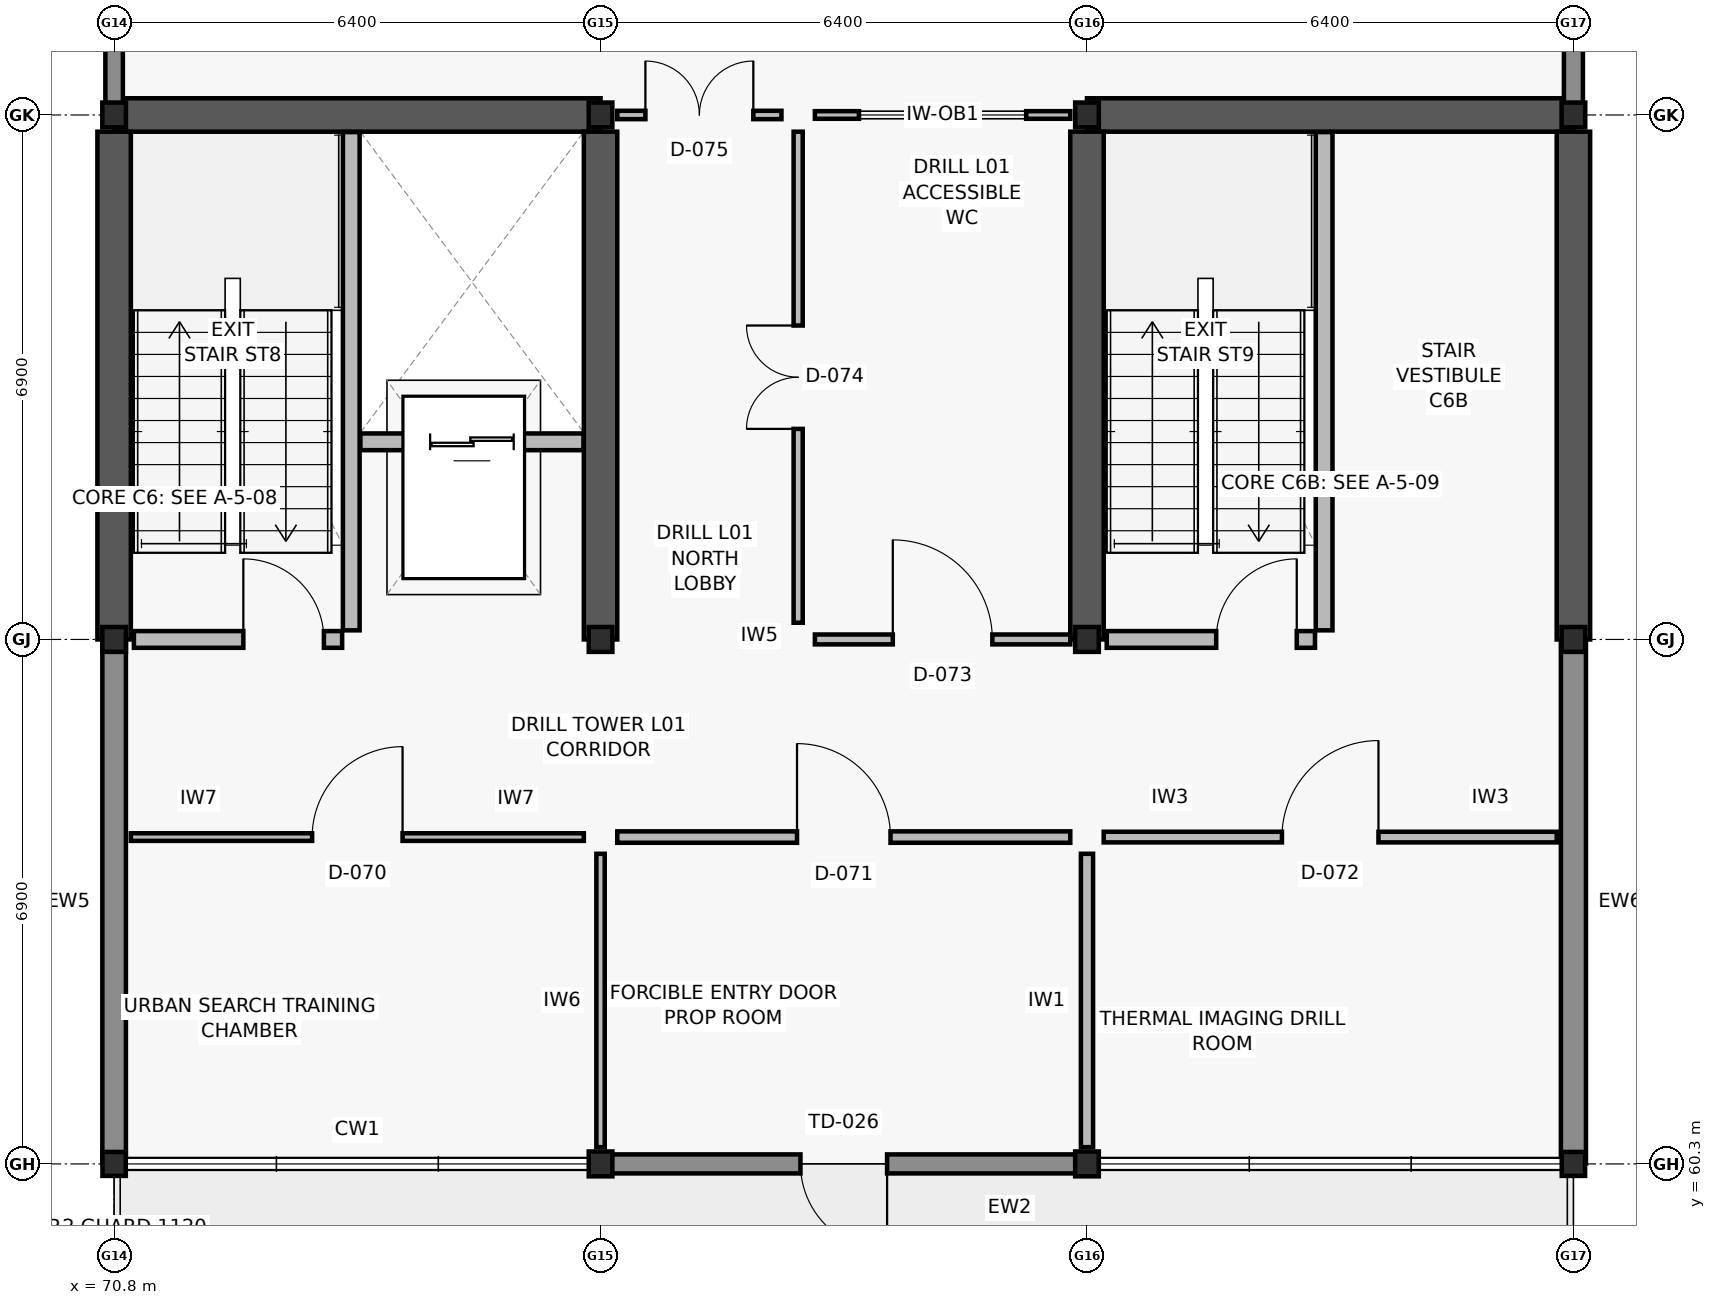
"""IFC4 building model, lengths in metres.
Left out: names, types, materials, properties, quantities, classifications, styles, units other than length and angle.
Written with IfcOpenShell. Run it as: python <this file> out.ifc"""

import sys

from ifc_helpers import new_model, si_unit, direction, frame, frame_2d, origin, origin_2d, place, context, subcontext, project, spatial, rectangle, i_section, extrude, element, fill, save


model = new_model("IFC4")
c1 = context("Model", 3, precision=1e-05, world=origin(), true_north=direction((0.0, 1.0)))
c2 = subcontext(c1, "Body", "Model", "MODEL_VIEW")
j1 = project(units=[si_unit("LENGTHUNIT", "METRE"), si_unit("PLANEANGLEUNIT", "RADIAN")], contexts=[c1])
p1 = place(None, origin())
s1 = spatial("IfcSite", under=j1, at=p1, CompositionType="ELEMENT")
p2 = place(p1, origin())
s2 = spatial("IfcBuilding", under=s1, at=p2, CompositionType="ELEMENT")
p3 = place(p2, frame((0.0, 0.0, 5.4)))
s3 = spatial("IfcBuildingStorey", under=s2, at=p3, CompositionType="ELEMENT", Elevation=5.4)
p4 = place(p3, frame((70.8, 60.3, 0.0), z_axis=(0.0, 0.0, 1.0), x_axis=(1.0, 0.0, 0.0)))
e1 = element("IfcColumn", 1, at=p4, inside=s3, PredefinedType="COLUMN", context=c2, shape_type="SweptSolid", body=[
    extrude(i_section(OverallWidth=0.307, OverallDepth=0.315, WebThickness=0.012, FlangeThickness=0.019, FilletRadius=0.017, at=origin_2d()), origin(), (0.0, 0.0, 1.0), 4.2),
])
for number, where, z_axis, x_axis in (
    (2, (70.8, 67.2, 0.0), (0.0, 0.0, 1.0), (1.0, 0.0, 0.0)),
    (3, (70.8, 74.1, 0.0), (0.0, 0.0, 1.0), (1.0, 0.0, 0.0)),
    (4, (77.2, 60.3, 0.0), (0.0, 0.0, 1.0), (1.0, 0.0, 0.0)),
    (5, (77.2, 67.2, 0.0), (0.0, 0.0, 1.0), (1.0, 0.0, 0.0)),
    (6, (77.2, 74.1, 0.0), (0.0, 0.0, 1.0), (1.0, 0.0, 0.0)),
    (7, (83.6, 60.3, 0.0), (0.0, 0.0, 1.0), (1.0, 0.0, 0.0)),
    (8, (83.6, 67.2, 0.0), (0.0, 0.0, 1.0), (1.0, 0.0, 0.0)),
    (9, (83.6, 74.1, 0.0), (0.0, 0.0, 1.0), (1.0, 0.0, 0.0)),
):
    element("IfcColumn", number, at=place(p3, frame(where, z_axis=z_axis, x_axis=x_axis)), inside=s3, PredefinedType="COLUMN", context=c2, shape_type="SweptSolid", body=[
        extrude(i_section(OverallWidth=0.311, OverallDepth=0.327, WebThickness=0.016, FlangeThickness=0.025, FilletRadius=0.017, at=origin_2d()), origin(), (0.0, 0.0, 1.0), 4.2),
    ])
p5 = place(p3, frame((90.0, 60.3, 0.0), z_axis=(0.0, 0.0, 1.0), x_axis=(1.0, 0.0, 0.0)))
e10 = element("IfcColumn", 10, at=p5, inside=s3, PredefinedType="COLUMN", context=c2, shape_type="SweptSolid", body=[
    extrude(i_section(OverallWidth=0.307, OverallDepth=0.315, WebThickness=0.012, FlangeThickness=0.019, FilletRadius=0.017, at=origin_2d()), origin(), (0.0, 0.0, 1.0), 4.2),
])
for number, where, z_axis, x_axis in (
    (11, (90.0, 67.2, 0.0), (0.0, 0.0, 1.0), (1.0, 0.0, 0.0)),
    (12, (90.0, 74.1, 0.0), (0.0, 0.0, 1.0), (1.0, 0.0, 0.0)),
):
    element("IfcColumn", number, at=place(p3, frame(where, z_axis=z_axis, x_axis=x_axis)), inside=s3, PredefinedType="COLUMN", context=c2, shape_type="SweptSolid", body=[
        extrude(i_section(OverallWidth=0.311, OverallDepth=0.327, WebThickness=0.016, FlangeThickness=0.025, FilletRadius=0.017, at=origin_2d()), origin(), (0.0, 0.0, 1.0), 4.2),
    ])
p6 = place(p3, frame((70.8, 74.1, 0.0), z_axis=(0.0, 0.0, 1.0), x_axis=(1.0, 0.0, 0.0)))
e13 = element("IfcWall", 13, at=p6, inside=s3, PredefinedType="SHEAR", context=c2, shape_type="SweptSolid", body=[
    extrude(rectangle(XDim=6.4, YDim=0.44, at=frame_2d((3.2, 0.0))), origin(), (0.0, 0.0, 1.0), 3.96),
])
for number, where, z_axis, x_axis in (
    (14, (70.8, 67.2, 0.0), (0.0, 0.0, 1.0), (0.0, 1.0, 0.0)),
    (15, (77.2, 67.2, 0.0), (0.0, 0.0, 1.0), (0.0, 1.0, 0.0)),
):
    element("IfcWall", number, at=place(p3, frame(where, z_axis=z_axis, x_axis=x_axis)), inside=s3, PredefinedType="SHEAR", context=c2, shape_type="SweptSolid", body=[
        extrude(rectangle(XDim=6.68, YDim=0.44, at=frame_2d((3.34, 0.0))), origin(), (0.0, 0.0, 1.0), 3.96),
    ])
p7 = place(p3, frame((83.6, 74.1, 0.0), z_axis=(0.0, 0.0, 1.0), x_axis=(1.0, 0.0, 0.0)))
e16 = element("IfcWall", 16, at=p7, inside=s3, PredefinedType="SHEAR", context=c2, shape_type="SweptSolid", body=[
    extrude(rectangle(XDim=6.4, YDim=0.44, at=frame_2d((3.2, 0.0))), origin(), (0.0, 0.0, 1.0), 3.96),
])
for number, where, z_axis, x_axis in (
    (17, (83.6, 67.2, 0.0), (0.0, 0.0, 1.0), (0.0, 1.0, 0.0)),
    (18, (90.0, 67.2, 0.0), (0.0, 0.0, 1.0), (0.0, 1.0, 0.0)),
):
    element("IfcWall", number, at=place(p3, frame(where, z_axis=z_axis, x_axis=x_axis)), inside=s3, PredefinedType="SHEAR", context=c2, shape_type="SweptSolid", body=[
        extrude(rectangle(XDim=6.68, YDim=0.44, at=frame_2d((3.34, 0.0))), origin(), (0.0, 0.0, 1.0), 3.96),
    ])
p8 = place(p3, frame((83.595, 60.3, 0.0), z_axis=(0.0, 0.0, 1.0), x_axis=(-1.0, 0.0, 0.0)))
e19 = element("IfcWall", 19, at=p8, inside=s3, PredefinedType="SOLIDWALL", context=c2, shape_type="SweptSolid", body=[
    extrude(rectangle(XDim=6.39, YDim=0.25, at=frame_2d((3.195, 0.0))), origin(), (0.0, 0.0, 1.0), 3.32),
])
p9 = place(p8, frame((2.625, 0.0, 0.0)))
e20 = element("IfcOpeningElement", 20, at=p9, cuts=e19, PredefinedType="OPENING", context=c2, shape_type="SweptSolid", body=[
    extrude(rectangle(XDim=1.14, YDim=2.14, at=frame_2d((0.57, 1.07))), frame((0.0, 0.135, 0.0), z_axis=(0.0, -1.0, 0.0), x_axis=(1.0, 0.0, 0.0)), (0.0, 0.0, 1.0), 0.27),
])
p10 = place(p3, frame((70.8, 60.305, 0.0), z_axis=(0.0, 0.0, 1.0), x_axis=(0.0, 1.0, 0.0)))
e21 = element("IfcWall", 21, at=p10, inside=s3, PredefinedType="SOLIDWALL", context=c2, shape_type="SweptSolid", body=[
    extrude(rectangle(XDim=6.89, YDim=0.31, at=frame_2d((3.445, 0.0))), origin(), (0.0, 0.0, 1.0), 3.32),
])
p11 = place(p3, frame((90.0, 67.195, 0.0), z_axis=(0.0, 0.0, 1.0), x_axis=(0.0, -1.0, 0.0)))
e22 = element("IfcWall", 22, at=p11, inside=s3, PredefinedType="SOLIDWALL", context=c2, shape_type="SweptSolid", body=[
    extrude(rectangle(XDim=6.89, YDim=0.33, at=frame_2d((3.445, 0.0))), origin(), (0.0, 0.0, 1.0), 3.32),
])
p12 = place(p3, frame((70.8, 74.105, 0.0), z_axis=(0.0, 0.0, 1.0), x_axis=(0.0, 1.0, 0.0)))
e23 = element("IfcWall", 23, at=p12, inside=s3, PredefinedType="SOLIDWALL", context=c2, shape_type="SweptSolid", body=[
    extrude(rectangle(XDim=6.89, YDim=0.23, at=frame_2d((3.445, 0.0))), origin(), (0.0, 0.0, 1.0), 3.32),
])
p13 = place(p12, frame((1.895, 0.0, 0.8)))
e24 = element("IfcOpeningElement", 24, at=p13, cuts=e23, PredefinedType="OPENING", context=c2, shape_type="SweptSolid", body=[
    extrude(rectangle(XDim=3.1, YDim=1.15, at=frame_2d((1.55, 0.575))), frame((0.0, 0.125, 0.0), z_axis=(0.0, -1.0, 0.0), x_axis=(1.0, 0.0, 0.0)), (0.0, 0.0, 1.0), 0.25),
])
p14 = place(p3, frame((90.0, 80.995, 0.0), z_axis=(0.0, 0.0, 1.0), x_axis=(0.0, -1.0, 0.0)))
e25 = element("IfcWall", 25, at=p14, inside=s3, PredefinedType="SOLIDWALL", context=c2, shape_type="SweptSolid", body=[
    extrude(rectangle(XDim=6.89, YDim=0.25, at=frame_2d((3.445, 0.0))), origin(), (0.0, 0.0, 1.0), 3.32),
])
p15 = place(p14, frame((1.795, 0.0, 0.8)))
e26 = element("IfcOpeningElement", 26, at=p15, cuts=e25, PredefinedType="OPENING", context=c2, shape_type="SweptSolid", body=[
    extrude(rectangle(XDim=3.3, YDim=1.25, at=frame_2d((1.65, 0.625))), frame((0.0, 0.135, 0.0), z_axis=(0.0, -1.0, 0.0), x_axis=(1.0, 0.0, 0.0)), (0.0, 0.0, 1.0), 0.27),
])
p16 = place(p3, frame((73.92, 67.32, 0.0), z_axis=(0.0, 0.0, 1.0), x_axis=(0.0, 1.0, 0.0)))
e27 = element("IfcWall", 27, at=p16, inside=s3, PredefinedType="SOLIDWALL", context=c2, shape_type="SweptSolid", body=[
    extrude(rectangle(XDim=6.555, YDim=0.22, at=frame_2d((3.277, 0.0))), origin(), (0.0, 0.0, 1.0), 3.96),
])
p17 = place(p3, frame((71.06, 67.2, 0.0), z_axis=(0.0, 0.0, 1.0), x_axis=(1.0, 0.0, 0.0)))
e28 = element("IfcWall", 28, at=p17, inside=s3, PredefinedType="SOLIDWALL", context=c2, shape_type="SweptSolid", body=[
    extrude(rectangle(XDim=2.74, YDim=0.22, at=frame_2d((1.37, 0.0))), origin(), (0.0, 0.0, 1.0), 3.32),
])
p18 = place(p17, frame((1.44, 0.0, 0.0)))
e29 = element("IfcOpeningElement", 29, at=p18, cuts=e28, PredefinedType="OPENING", context=c2, shape_type="SweptSolid", body=[
    extrude(rectangle(XDim=1.06, YDim=2.1, at=frame_2d((0.53, 1.05))), frame((0.0, 0.12, 0.0), z_axis=(0.0, -1.0, 0.0), x_axis=(1.0, 0.0, 0.0)), (0.0, 0.0, 1.0), 0.24),
])
p19 = place(p3, frame((74.04, 69.8, 0.0), z_axis=(0.0, 0.0, 1.0), x_axis=(1.0, 0.0, 0.0)))
e30 = element("IfcWall", 30, at=p19, inside=s3, PredefinedType="SOLIDWALL", context=c2, shape_type="SweptSolid", body=[
    extrude(rectangle(XDim=2.935, YDim=0.22, at=frame_2d((1.468, 0.0))), origin(), (0.0, 0.0, 1.0), 3.96),
])
p20 = place(p19, frame((0.917, 0.0, 0.0)))
e31 = element("IfcOpeningElement", 31, at=p20, cuts=e30, PredefinedType="OPENING", context=c2, shape_type="SweptSolid", body=[
    extrude(rectangle(XDim=1.1, YDim=2.1, at=frame_2d((0.55, 1.05))), frame((0.0, 0.12, 0.0), z_axis=(0.0, -1.0, 0.0), x_axis=(1.0, 0.0, 0.0)), (0.0, 0.0, 1.0), 0.24),
])
p21 = place(p3, frame((86.72, 67.32, 0.0), z_axis=(0.0, 0.0, 1.0), x_axis=(0.0, 1.0, 0.0)))
e32 = element("IfcWall", 32, at=p21, inside=s3, PredefinedType="SOLIDWALL", context=c2, shape_type="SweptSolid", body=[
    extrude(rectangle(XDim=6.555, YDim=0.22, at=frame_2d((3.277, 0.0))), origin(), (0.0, 0.0, 1.0), 3.96),
])
p22 = place(p3, frame((83.86, 67.2, 0.0), z_axis=(0.0, 0.0, 1.0), x_axis=(1.0, 0.0, 0.0)))
e33 = element("IfcWall", 33, at=p22, inside=s3, PredefinedType="SOLIDWALL", context=c2, shape_type="SweptSolid", body=[
    extrude(rectangle(XDim=2.74, YDim=0.22, at=frame_2d((1.37, 0.0))), origin(), (0.0, 0.0, 1.0), 3.32),
])
p23 = place(p22, frame((1.44, 0.0, 0.0)))
e34 = element("IfcOpeningElement", 34, at=p23, cuts=e33, PredefinedType="OPENING", context=c2, shape_type="SweptSolid", body=[
    extrude(rectangle(XDim=1.06, YDim=2.1, at=frame_2d((0.53, 1.05))), frame((0.0, 0.12, 0.0), z_axis=(0.0, -1.0, 0.0), x_axis=(1.0, 0.0, 0.0)), (0.0, 0.0, 1.0), 0.24),
])
p24 = place(p3, frame((77.2, 60.52, 0.0), z_axis=(0.0, 0.0, 1.0), x_axis=(0.0, 1.0, 0.0)))
e35 = element("IfcWall", 35, at=p24, inside=s3, PredefinedType="PARTITIONING", context=c2, shape_type="SweptSolid", body=[
    extrude(rectangle(XDim=3.86, YDim=0.11, at=frame_2d((1.93, 0.0))), origin(), (0.0, 0.0, 1.0), 3.3),
])
p25 = place(p3, frame((71.02, 64.6, 0.0), z_axis=(0.0, 0.0, 1.0), x_axis=(1.0, 0.0, 0.0)))
e36 = element("IfcWall", 36, at=p25, inside=s3, PredefinedType="PARTITIONING", context=c2, shape_type="SweptSolid", body=[
    extrude(rectangle(XDim=5.96, YDim=0.1, at=frame_2d((2.98, 0.0))), origin(), (0.0, 0.0, 1.0), 3.3),
])
p26 = place(p25, frame((2.385, 0.0, 0.0)))
e37 = element("IfcOpeningElement", 37, at=p26, cuts=e36, PredefinedType="OPENING", context=c2, shape_type="SweptSolid", body=[
    extrude(rectangle(XDim=1.19, YDim=2.14, at=frame_2d((0.595, 1.07))), frame((0.0, 0.06, 0.0), z_axis=(0.0, -1.0, 0.0), x_axis=(1.0, 0.0, 0.0)), (0.0, 0.0, 1.0), 0.12),
])
p27 = place(p3, frame((83.6, 60.52, 0.0), z_axis=(0.0, 0.0, 1.0), x_axis=(0.0, 1.0, 0.0)))
e38 = element("IfcWall", 38, at=p27, inside=s3, PredefinedType="PARTITIONING", context=c2, shape_type="SweptSolid", body=[
    extrude(rectangle(XDim=3.86, YDim=0.16, at=frame_2d((1.93, 0.0))), origin(), (0.0, 0.0, 1.0), 3.3),
])
p28 = place(p3, frame((77.42, 64.6, 0.0), z_axis=(0.0, 0.0, 1.0), x_axis=(1.0, 0.0, 0.0)))
e39 = element("IfcWall", 39, at=p28, inside=s3, PredefinedType="PARTITIONING", context=c2, shape_type="SweptSolid", body=[
    extrude(rectangle(XDim=5.96, YDim=0.15, at=frame_2d((2.98, 0.0))), origin(), (0.0, 0.0, 1.0), 3.3),
])
p29 = place(p28, frame((2.365, 0.0, 0.0)))
e40 = element("IfcOpeningElement", 40, at=p29, cuts=e39, PredefinedType="OPENING", context=c2, shape_type="SweptSolid", body=[
    extrude(rectangle(XDim=1.23, YDim=2.08, at=frame_2d((0.615, 1.04))), frame((0.0, 0.085, 0.0), z_axis=(0.0, -1.0, 0.0), x_axis=(1.0, 0.0, 0.0)), (0.0, 0.0, 1.0), 0.17),
])
p30 = place(p3, frame((83.82, 64.6, 0.0), z_axis=(0.0, 0.0, 1.0), x_axis=(1.0, 0.0, 0.0)))
e41 = element("IfcWall", 41, at=p30, inside=s3, PredefinedType="PARTITIONING", context=c2, shape_type="SweptSolid", body=[
    extrude(rectangle(XDim=5.96, YDim=0.14, at=frame_2d((2.98, 0.0))), origin(), (0.0, 0.0, 1.0), 3.3),
])
p31 = place(p30, frame((2.345, 0.0, 0.0)))
e42 = element("IfcOpeningElement", 42, at=p31, cuts=e41, PredefinedType="OPENING", context=c2, shape_type="SweptSolid", body=[
    extrude(rectangle(XDim=1.27, YDim=2.1, at=frame_2d((0.635, 1.05))), frame((0.0, 0.08, 0.0), z_axis=(0.0, -1.0, 0.0), x_axis=(1.0, 0.0, 0.0)), (0.0, 0.0, 1.0), 0.16),
])
p32 = place(p3, frame((80.02, 67.2, 0.0), z_axis=(0.0, 0.0, 1.0), x_axis=(1.0, 0.0, 0.0)))
e43 = element("IfcWall", 43, at=p32, inside=s3, PredefinedType="PARTITIONING", context=c2, shape_type="SweptSolid", body=[
    extrude(rectangle(XDim=3.36, YDim=0.13, at=frame_2d((1.68, 0.0))), origin(), (0.0, 0.0, 1.0), 3.3),
])
p33 = place(p32, frame((1.025, 0.0, 0.0)))
e44 = element("IfcOpeningElement", 44, at=p33, cuts=e43, PredefinedType="OPENING", context=c2, shape_type="SweptSolid", body=[
    extrude(rectangle(XDim=1.31, YDim=2.14, at=frame_2d((0.655, 1.07))), frame((0.0, 0.075, 0.0), z_axis=(0.0, -1.0, 0.0), x_axis=(1.0, 0.0, 0.0)), (0.0, 0.0, 1.0), 0.15),
])
p34 = place(p3, frame((79.8, 67.42, 0.0), z_axis=(0.0, 0.0, 1.0), x_axis=(0.0, 1.0, 0.0)))
e45 = element("IfcWall", 45, at=p34, inside=s3, PredefinedType="PARTITIONING", context=c2, shape_type="SweptSolid", body=[
    extrude(rectangle(XDim=6.46, YDim=0.12, at=frame_2d((3.23, 0.0))), origin(), (0.0, 0.0, 1.0), 3.3),
])
p35 = place(p34, frame((2.55, 0.0, 0.0)))
e46 = element("IfcOpeningElement", 46, at=p35, cuts=e45, PredefinedType="OPENING", context=c2, shape_type="SweptSolid", body=[
    extrude(rectangle(XDim=1.36, YDim=2.15, at=frame_2d((0.68, 1.075))), frame((0.0, 0.07, 0.0), z_axis=(0.0, -1.0, 0.0), x_axis=(1.0, 0.0, 0.0)), (0.0, 0.0, 1.0), 0.14),
])
p36 = place(p3, frame((77.42, 74.1, 0.0), z_axis=(0.0, 0.0, 1.0), x_axis=(1.0, 0.0, 0.0)))
e47 = element("IfcWall", 47, at=p36, inside=s3, PredefinedType="PARTITIONING", context=c2, shape_type="SweptSolid", body=[
    extrude(rectangle(XDim=2.16, YDim=0.11, at=frame_2d((1.08, 0.0))), origin(), (0.0, 0.0, 1.0), 3.3),
])
p37 = place(p36, frame((0.37, 0.0, 0.0)))
e48 = element("IfcOpeningElement", 48, at=p37, cuts=e47, PredefinedType="OPENING", context=c2, shape_type="SweptSolid", body=[
    extrude(rectangle(XDim=1.42, YDim=2.15, at=frame_2d((0.71, 1.075))), frame((0.0, 0.065, 0.0), z_axis=(0.0, -1.0, 0.0), x_axis=(1.0, 0.0, 0.0)), (0.0, 0.0, 1.0), 0.13),
])
p38 = place(p3, frame((80.02, 74.1, 0.0), z_axis=(0.0, 0.0, 1.0), x_axis=(1.0, 0.0, 0.0)))
e49 = element("IfcWall", 49, at=p38, inside=s3, PredefinedType="PARTITIONING", context=c2, shape_type="SweptSolid", body=[
    extrude(rectangle(XDim=3.36, YDim=0.1, at=frame_2d((1.68, 0.0))), origin(), (0.0, 0.0, 1.0), 3.3),
])
p39 = place(p38, frame((0.58, 0.0, 0.95)))
e50 = element("IfcOpeningElement", 50, at=p39, cuts=e49, PredefinedType="OPENING", context=c2, shape_type="SweptSolid", body=[
    extrude(rectangle(XDim=2.2, YDim=1.3, at=frame_2d((1.1, 0.65))), frame((0.0, 0.06, 0.0), z_axis=(0.0, -1.0, 0.0), x_axis=(1.0, 0.0, 0.0)), (0.0, 0.0, 1.0), 0.12),
])
p40 = place(p9, origin())
e51 = element("IfcDoor", 51, at=p40, inside=s3, OperationType="SINGLE_SWING_LEFT", PredefinedType="DOOR", context=c2, shape_type="SweptSolid", body=[
    extrude(rectangle(XDim=1.14, YDim=2.14, at=frame_2d((0.57, 1.07))), frame((0.0, 0.025, 0.0), z_axis=(0.0, -1.0, 0.0), x_axis=(1.0, 0.0, 0.0)), (0.0, 0.0, 1.0), 0.05),
])
fill(e20, e51)
p41 = place(p18, origin())
e52 = element("IfcDoor", 52, at=p41, inside=s3, OperationType="SINGLE_SWING_LEFT", PredefinedType="DOOR", context=c2, shape_type="SweptSolid", body=[
    extrude(rectangle(XDim=1.06, YDim=2.1, at=frame_2d((0.53, 1.05))), frame((0.0, 0.025, 0.0), z_axis=(0.0, -1.0, 0.0), x_axis=(1.0, 0.0, 0.0)), (0.0, 0.0, 1.0), 0.05),
])
fill(e29, e52)
p42 = place(p20, origin())
e53 = element("IfcDoor", 53, at=p42, inside=s3, OperationType="DOUBLE_DOOR_SLIDING", PredefinedType="DOOR", context=c2, shape_type="SweptSolid", body=[
    extrude(rectangle(XDim=1.1, YDim=2.1, at=frame_2d((0.55, 1.05))), frame((0.0, 0.025, 0.0), z_axis=(0.0, -1.0, 0.0), x_axis=(1.0, 0.0, 0.0)), (0.0, 0.0, 1.0), 0.05),
])
fill(e31, e53)
p43 = place(p23, origin())
e54 = element("IfcDoor", 54, at=p43, inside=s3, OperationType="SINGLE_SWING_RIGHT", PredefinedType="DOOR", context=c2, shape_type="SweptSolid", body=[
    extrude(rectangle(XDim=1.06, YDim=2.1, at=frame_2d((0.53, 1.05))), frame((0.0, 0.025, 0.0), z_axis=(0.0, -1.0, 0.0), x_axis=(1.0, 0.0, 0.0)), (0.0, 0.0, 1.0), 0.05),
])
fill(e34, e54)
p44 = place(p26, origin())
e55 = element("IfcDoor", 55, at=p44, inside=s3, OperationType="SINGLE_SWING_RIGHT", PredefinedType="DOOR", context=c2, shape_type="SweptSolid", body=[
    extrude(rectangle(XDim=1.19, YDim=2.14, at=frame_2d((0.595, 1.07))), frame((0.0, 0.025, 0.0), z_axis=(0.0, -1.0, 0.0), x_axis=(1.0, 0.0, 0.0)), (0.0, 0.0, 1.0), 0.05),
])
fill(e37, e55)
p45 = place(p29, origin())
e56 = element("IfcDoor", 56, at=p45, inside=s3, OperationType="SINGLE_SWING_LEFT", PredefinedType="DOOR", context=c2, shape_type="SweptSolid", body=[
    extrude(rectangle(XDim=1.23, YDim=2.08, at=frame_2d((0.615, 1.04))), frame((0.0, 0.025, 0.0), z_axis=(0.0, -1.0, 0.0), x_axis=(1.0, 0.0, 0.0)), (0.0, 0.0, 1.0), 0.05),
])
fill(e40, e56)
p46 = place(p31, origin())
e57 = element("IfcDoor", 57, at=p46, inside=s3, OperationType="SINGLE_SWING_RIGHT", PredefinedType="DOOR", context=c2, shape_type="SweptSolid", body=[
    extrude(rectangle(XDim=1.27, YDim=2.1, at=frame_2d((0.635, 1.05))), frame((0.0, 0.025, 0.0), z_axis=(0.0, -1.0, 0.0), x_axis=(1.0, 0.0, 0.0)), (0.0, 0.0, 1.0), 0.05),
])
fill(e42, e57)
p47 = place(p33, origin())
e58 = element("IfcDoor", 58, at=p47, inside=s3, OperationType="SINGLE_SWING_LEFT", PredefinedType="DOOR", context=c2, shape_type="SweptSolid", body=[
    extrude(rectangle(XDim=1.31, YDim=2.14, at=frame_2d((0.655, 1.07))), frame((0.0, 0.025, 0.0), z_axis=(0.0, -1.0, 0.0), x_axis=(1.0, 0.0, 0.0)), (0.0, 0.0, 1.0), 0.05),
])
fill(e44, e58)
p48 = place(p35, origin())
e59 = element("IfcDoor", 59, at=p48, inside=s3, OperationType="DOUBLE_DOOR_SINGLE_SWING", PredefinedType="DOOR", context=c2, shape_type="SweptSolid", body=[
    extrude(rectangle(XDim=1.36, YDim=2.15, at=frame_2d((0.68, 1.075))), frame((0.0, 0.025, 0.0), z_axis=(0.0, -1.0, 0.0), x_axis=(1.0, 0.0, 0.0)), (0.0, 0.0, 1.0), 0.05),
])
fill(e46, e59)
p49 = place(p37, origin())
e60 = element("IfcDoor", 60, at=p49, inside=s3, OperationType="DOUBLE_DOOR_SINGLE_SWING", PredefinedType="DOOR", context=c2, shape_type="SweptSolid", body=[
    extrude(rectangle(XDim=1.42, YDim=2.15, at=frame_2d((0.71, 1.075))), frame((0.0, 0.025, 0.0), z_axis=(0.0, -1.0, 0.0), x_axis=(1.0, 0.0, 0.0)), (0.0, 0.0, 1.0), 0.05),
])
fill(e48, e60)
p50 = place(p39, origin())
e61 = element("IfcWindow", 61, at=p50, inside=s3, PartitioningType="DOUBLE_PANEL_VERTICAL", PredefinedType="WINDOW", context=c2, shape_type="SweptSolid", body=[
    extrude(rectangle(XDim=2.2, YDim=1.3, at=frame_2d((1.1, 0.65))), frame((0.0, 0.03, 0.0), z_axis=(0.0, -1.0, 0.0), x_axis=(1.0, 0.0, 0.0)), (0.0, 0.0, 1.0), 0.06),
])
fill(e50, e61)
save(model, sys.argv[1])
